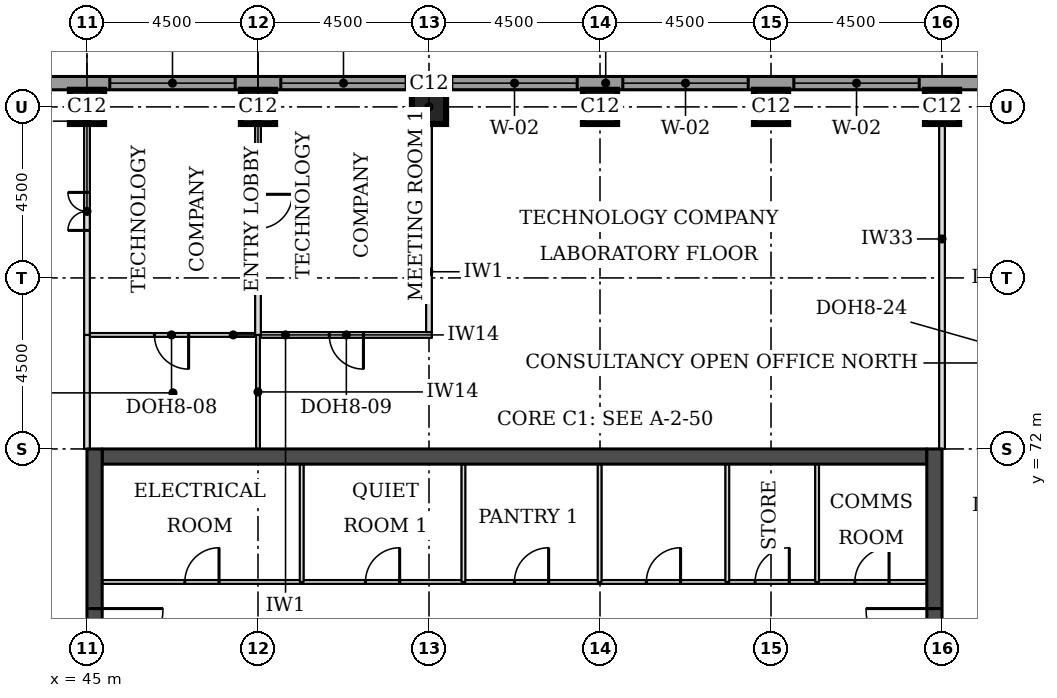
"""IFC4 building model, lengths in metres.
Left out: names, types, materials, properties, quantities, classifications, styles, units other than length and angle.
Written with IfcOpenShell. Run it as: python <this file> out.ifc"""

import sys

from ifc_helpers import new_model, si_unit, direction, frame, frame_2d, origin, origin_2d, place, context, subcontext, project, spatial, rectangle, extrude, element, fill, save


model = new_model("IFC4")
c1 = context("Model", 3, precision=1e-05, world=origin(), true_north=direction((0.0, 1.0)))
c2 = subcontext(c1, "Body", "Model", "MODEL_VIEW")
j1 = project(units=[si_unit("LENGTHUNIT", "METRE"), si_unit("PLANEANGLEUNIT", "RADIAN")], contexts=[c1])
p1 = place(None, origin())
s1 = spatial("IfcSite", under=j1, at=p1, CompositionType="ELEMENT")
p2 = place(p1, origin())
s2 = spatial("IfcBuilding", under=s1, at=p2, CompositionType="ELEMENT")
p3 = place(p2, frame((0.0, 0.0, 203.2)))
s3 = spatial("IfcBuildingStorey", under=s2, at=p3, CompositionType="ELEMENT", Elevation=203.2)
for number, where, z_axis, x_axis in (
    (1, (45.0, 81.0, 0.0), (0.0, 0.0, 1.0), (1.0, 0.0, 0.0)),
    (2, (49.5, 81.0, 0.0), (0.0, 0.0, 1.0), (1.0, 0.0, 0.0)),
    (3, (54.0, 81.0, 0.0), (0.0, 0.0, 1.0), (1.0, 0.0, 0.0)),
    (4, (58.5, 81.0, 0.0), (0.0, 0.0, 1.0), (1.0, 0.0, 0.0)),
    (5, (63.0, 81.0, 0.0), (0.0, 0.0, 1.0), (1.0, 0.0, 0.0)),
    (6, (67.5, 81.0, 0.0), (0.0, 0.0, 1.0), (1.0, 0.0, 0.0)),
):
    element("IfcColumn", number, at=place(p3, frame(where, z_axis=z_axis, x_axis=x_axis)), inside=s3, PredefinedType="COLUMN", context=c2, shape_type="SweptSolid", body=[
        extrude(rectangle(XDim=0.9, YDim=0.9, at=origin_2d()), origin(), (0.0, 0.0, 1.0), 3.7),
    ])
p4 = place(p3, frame((45.4, 71.8, 0.0), z_axis=(0.0, 0.0, 1.0), x_axis=(1.0, 0.0, 0.0)))
e7 = element("IfcWall", 7, at=p4, inside=s3, PredefinedType="SHEAR", context=c2, shape_type="SweptSolid", body=[
    extrude(rectangle(XDim=21.7, YDim=0.4, at=frame_2d((10.85, 0.0))), origin(), (0.0, 0.0, 1.0), 3.7),
])
p5 = place(p3, frame((45.2, 49.5, 0.0), z_axis=(0.0, 0.0, 1.0), x_axis=(0.0, 1.0, 0.0)))
e8 = element("IfcWall", 8, at=p5, inside=s3, PredefinedType="SHEAR", context=c2, shape_type="SweptSolid", body=[
    extrude(rectangle(XDim=22.5, YDim=0.4, at=frame_2d((11.25, 0.0))), origin(), (0.0, 0.0, 1.0), 3.7),
])
p6 = place(p5, frame((4.2, 0.0, 0.0)))
e9 = element("IfcOpeningElement", 9, at=p6, cuts=e8, PredefinedType="OPENING", context=c2, shape_type="SweptSolid", body=[
    extrude(rectangle(XDim=1.8, YDim=2.1, at=frame_2d((0.9, 1.05))), frame((0.0, 0.21, 0.0), z_axis=(0.0, -1.0, 0.0), x_axis=(1.0, 0.0, 0.0)), (0.0, 0.0, 1.0), 0.42),
])
p7 = place(p5, frame((6.9, 0.0, 0.0)))
e10 = element("IfcOpeningElement", 10, at=p7, cuts=e8, PredefinedType="OPENING", context=c2, shape_type="SweptSolid", body=[
    extrude(rectangle(XDim=1.1, YDim=2.1, at=frame_2d((0.55, 1.05))), frame((0.0, 0.21, 0.0), z_axis=(0.0, -1.0, 0.0), x_axis=(1.0, 0.0, 0.0)), (0.0, 0.0, 1.0), 0.42),
])
p8 = place(p5, frame((13.6, 0.0, 0.0)))
e11 = element("IfcOpeningElement", 11, at=p8, cuts=e8, PredefinedType="OPENING", context=c2, shape_type="SweptSolid", body=[
    extrude(rectangle(XDim=1.1, YDim=2.1, at=frame_2d((0.55, 1.05))), frame((0.0, 0.21, 0.0), z_axis=(0.0, -1.0, 0.0), x_axis=(1.0, 0.0, 0.0)), (0.0, 0.0, 1.0), 0.42),
])
p9 = place(p5, frame((16.5, 0.0, 0.0)))
e12 = element("IfcOpeningElement", 12, at=p9, cuts=e8, PredefinedType="OPENING", context=c2, shape_type="SweptSolid", body=[
    extrude(rectangle(XDim=1.8, YDim=2.1, at=frame_2d((0.9, 1.05))), frame((0.0, 0.21, 0.0), z_axis=(0.0, -1.0, 0.0), x_axis=(1.0, 0.0, 0.0)), (0.0, 0.0, 1.0), 0.42),
])
p10 = place(p3, frame((67.3, 49.5, 0.0), z_axis=(0.0, 0.0, 1.0), x_axis=(0.0, 1.0, 0.0)))
e13 = element("IfcWall", 13, at=p10, inside=s3, PredefinedType="SHEAR", context=c2, shape_type="SweptSolid", body=[
    extrude(rectangle(XDim=22.5, YDim=0.4, at=frame_2d((11.25, 0.0))), origin(), (0.0, 0.0, 1.0), 3.7),
])
p11 = place(p10, frame((4.2, 0.0, 0.0)))
e14 = element("IfcOpeningElement", 14, at=p11, cuts=e13, PredefinedType="OPENING", context=c2, shape_type="SweptSolid", body=[
    extrude(rectangle(XDim=1.8, YDim=2.1, at=frame_2d((0.9, 1.05))), frame((0.0, 0.21, 0.0), z_axis=(0.0, -1.0, 0.0), x_axis=(1.0, 0.0, 0.0)), (0.0, 0.0, 1.0), 0.42),
])
p12 = place(p10, frame((6.9, 0.0, 0.0)))
e15 = element("IfcOpeningElement", 15, at=p12, cuts=e13, PredefinedType="OPENING", context=c2, shape_type="SweptSolid", body=[
    extrude(rectangle(XDim=1.1, YDim=2.1, at=frame_2d((0.55, 1.05))), frame((0.0, 0.21, 0.0), z_axis=(0.0, -1.0, 0.0), x_axis=(1.0, 0.0, 0.0)), (0.0, 0.0, 1.0), 0.42),
])
p13 = place(p10, frame((13.6, 0.0, 0.0)))
e16 = element("IfcOpeningElement", 16, at=p13, cuts=e13, PredefinedType="OPENING", context=c2, shape_type="SweptSolid", body=[
    extrude(rectangle(XDim=1.1, YDim=2.1, at=frame_2d((0.55, 1.05))), frame((0.0, 0.21, 0.0), z_axis=(0.0, -1.0, 0.0), x_axis=(1.0, 0.0, 0.0)), (0.0, 0.0, 1.0), 0.42),
])
p14 = place(p10, frame((16.5, 0.0, 0.0)))
e17 = element("IfcOpeningElement", 17, at=p14, cuts=e13, PredefinedType="OPENING", context=c2, shape_type="SweptSolid", body=[
    extrude(rectangle(XDim=1.8, YDim=2.1, at=frame_2d((0.9, 1.05))), frame((0.0, 0.21, 0.0), z_axis=(0.0, -1.0, 0.0), x_axis=(1.0, 0.0, 0.0)), (0.0, 0.0, 1.0), 0.42),
])
p15 = place(p3, frame((72.331, 81.625, 0.0), z_axis=(0.0, 0.0, 1.0), x_axis=(-1.0, 0.0, 0.0)))
e18 = element("IfcWall", 18, at=p15, inside=s3, PredefinedType="STANDARD", context=c2, shape_type="SweptSolid", body=[
    extrude(rectangle(XDim=32.163, YDim=0.35, at=frame_2d((16.081, 0.0))), origin(), (0.0, 0.0, 1.0), 3.525),
])
p16 = place(p15, frame((5.431, 0.0, 0.9)))
e19 = element("IfcOpeningElement", 19, at=p16, cuts=e18, PredefinedType="OPENING", context=c2, shape_type="SweptSolid", body=[
    extrude(rectangle(XDim=3.3, YDim=1.9, at=frame_2d((1.65, 0.95))), frame((0.0, 0.185, 0.0), z_axis=(0.0, -1.0, 0.0), x_axis=(1.0, 0.0, 0.0)), (0.0, 0.0, 1.0), 0.37),
])
p17 = place(p15, frame((9.931, 0.0, 0.9)))
e20 = element("IfcOpeningElement", 20, at=p17, cuts=e18, PredefinedType="OPENING", context=c2, shape_type="SweptSolid", body=[
    extrude(rectangle(XDim=3.3, YDim=1.9, at=frame_2d((1.65, 0.95))), frame((0.0, 0.185, 0.0), z_axis=(0.0, -1.0, 0.0), x_axis=(1.0, 0.0, 0.0)), (0.0, 0.0, 1.0), 0.37),
])
p18 = place(p15, frame((14.431, 0.0, 0.9)))
e21 = element("IfcOpeningElement", 21, at=p18, cuts=e18, PredefinedType="OPENING", context=c2, shape_type="SweptSolid", body=[
    extrude(rectangle(XDim=3.3, YDim=1.9, at=frame_2d((1.65, 0.95))), frame((0.0, 0.185, 0.0), z_axis=(0.0, -1.0, 0.0), x_axis=(1.0, 0.0, 0.0)), (0.0, 0.0, 1.0), 0.37),
])
p19 = place(p15, frame((18.931, 0.0, 0.9)))
e22 = element("IfcOpeningElement", 22, at=p19, cuts=e18, PredefinedType="OPENING", context=c2, shape_type="SweptSolid", body=[
    extrude(rectangle(XDim=3.3, YDim=1.9, at=frame_2d((1.65, 0.95))), frame((0.0, 0.185, 0.0), z_axis=(0.0, -1.0, 0.0), x_axis=(1.0, 0.0, 0.0)), (0.0, 0.0, 1.0), 0.37),
])
p20 = place(p15, frame((23.431, 0.0, 0.9)))
e23 = element("IfcOpeningElement", 23, at=p20, cuts=e18, PredefinedType="OPENING", context=c2, shape_type="SweptSolid", body=[
    extrude(rectangle(XDim=3.3, YDim=1.9, at=frame_2d((1.65, 0.95))), frame((0.0, 0.185, 0.0), z_axis=(0.0, -1.0, 0.0), x_axis=(1.0, 0.0, 0.0)), (0.0, 0.0, 1.0), 0.37),
])
p21 = place(p3, frame((45.075, 75.0, 0.0), z_axis=(0.0, 0.0, 1.0), x_axis=(1.0, 0.0, 0.0)))
e24 = element("IfcWall", 24, at=p21, inside=s3, PredefinedType="PARTITIONING", context=c2, shape_type="SweptSolid", body=[
    extrude(rectangle(XDim=4.35, YDim=0.1, at=frame_2d((2.175, 0.0))), origin(), (0.0, 0.0, 1.0), 3.55),
])
p22 = place(p21, frame((1.7, 0.0, 0.0)))
e25 = element("IfcOpeningElement", 25, at=p22, cuts=e24, PredefinedType="OPENING", context=c2, shape_type="SweptSolid", body=[
    extrude(rectangle(XDim=0.9, YDim=2.1, at=frame_2d((0.45, 1.05))), frame((0.0, 0.06, 0.0), z_axis=(0.0, -1.0, 0.0), x_axis=(1.0, 0.0, 0.0)), (0.0, 0.0, 1.0), 0.12),
])
p23 = place(p3, frame((49.575, 75.0, 0.0), z_axis=(0.0, 0.0, 1.0), x_axis=(1.0, 0.0, 0.0)))
e26 = element("IfcWall", 26, at=p23, inside=s3, PredefinedType="PARTITIONING", context=c2, shape_type="SweptSolid", body=[
    extrude(rectangle(XDim=4.5, YDim=0.15, at=frame_2d((2.25, 0.0))), origin(), (0.0, 0.0, 1.0), 3.55),
])
p24 = place(p23, frame((1.8, 0.0, 0.0)))
e27 = element("IfcOpeningElement", 27, at=p24, cuts=e26, PredefinedType="OPENING", context=c2, shape_type="SweptSolid", body=[
    extrude(rectangle(XDim=0.9, YDim=2.1, at=frame_2d((0.45, 1.05))), frame((0.0, 0.085, 0.0), z_axis=(0.0, -1.0, 0.0), x_axis=(1.0, 0.0, 0.0)), (0.0, 0.0, 1.0), 0.17),
])
p25 = place(p3, frame((45.0, 72.0, 0.0), z_axis=(0.0, 0.0, 1.0), x_axis=(0.0, 1.0, 0.0)))
e28 = element("IfcWall", 28, at=p25, inside=s3, PredefinedType="PARTITIONING", context=c2, shape_type="SweptSolid", body=[
    extrude(rectangle(XDim=3.0, YDim=0.15, at=frame_2d((1.5, 0.0))), origin(), (0.0, 0.0, 1.0), 2.938),
])
p26 = place(p3, frame((49.5, 72.0, 0.0), z_axis=(0.0, 0.0, 1.0), x_axis=(0.0, 1.0, 0.0)))
e29 = element("IfcWall", 29, at=p26, inside=s3, PredefinedType="PARTITIONING", context=c2, shape_type="SweptSolid", body=[
    extrude(rectangle(XDim=3.0, YDim=0.1, at=frame_2d((1.5, 0.0))), origin(), (0.0, 0.0, 1.0), 3.55),
])
p27 = place(p3, frame((67.5, 72.0, 0.0), z_axis=(0.0, 0.0, 1.0), x_axis=(0.0, 1.0, 0.0)))
e30 = element("IfcWall", 30, at=p27, inside=s3, PredefinedType="PARTITIONING", context=c2, shape_type="SweptSolid", body=[
    extrude(rectangle(XDim=9.45, YDim=0.15, at=frame_2d((4.725, 0.0))), origin(), (0.0, 0.0, 1.0), 2.938),
])
p28 = place(p3, frame((45.0, 75.0, 0.0), z_axis=(0.0, 0.0, 1.0), x_axis=(0.0, 1.0, 0.0)))
e31 = element("IfcWall", 31, at=p28, inside=s3, PredefinedType="PARTITIONING", context=c2, shape_type="SweptSolid", body=[
    extrude(rectangle(XDim=6.45, YDim=0.15, at=frame_2d((3.225, 0.0))), origin(), (0.0, 0.0, 1.0), 2.938),
])
p29 = place(p28, frame((2.75, 0.0, 0.0)))
e32 = element("IfcOpeningElement", 32, at=p29, cuts=e31, PredefinedType="OPENING", context=c2, shape_type="SweptSolid", body=[
    extrude(rectangle(XDim=1.0, YDim=2.1, at=frame_2d((0.5, 1.05))), frame((0.0, 0.085, 0.0), z_axis=(0.0, -1.0, 0.0), x_axis=(1.0, 0.0, 0.0)), (0.0, 0.0, 1.0), 0.17),
])
p30 = place(p3, frame((49.5, 75.0, 0.0), z_axis=(0.0, 0.0, 1.0), x_axis=(0.0, 1.0, 0.0)))
e33 = element("IfcWall", 33, at=p30, inside=s3, PredefinedType="PARTITIONING", context=c2, shape_type="SweptSolid", body=[
    extrude(rectangle(XDim=6.45, YDim=0.15, at=frame_2d((3.225, 0.0))), origin(), (0.0, 0.0, 1.0), 3.55),
])
p31 = place(p30, frame((2.8, 0.0, 0.0)))
e34 = element("IfcOpeningElement", 34, at=p31, cuts=e33, PredefinedType="OPENING", context=c2, shape_type="SweptSolid", body=[
    extrude(rectangle(XDim=0.9, YDim=2.1, at=frame_2d((0.45, 1.05))), frame((0.0, 0.085, 0.0), z_axis=(0.0, -1.0, 0.0), x_axis=(1.0, 0.0, 0.0)), (0.0, 0.0, 1.0), 0.17),
])
p32 = place(p3, frame((54.0, 75.075, 0.0), z_axis=(0.0, 0.0, 1.0), x_axis=(0.0, 1.0, 0.0)))
e35 = element("IfcWall", 35, at=p32, inside=s3, PredefinedType="PARTITIONING", context=c2, shape_type="SweptSolid", body=[
    extrude(rectangle(XDim=6.375, YDim=0.15, at=frame_2d((3.188, 0.0))), origin(), (0.0, 0.0, 1.0), 3.55),
])
p33 = place(p3, frame((45.4, 68.5, 0.0), z_axis=(0.0, 0.0, 1.0), x_axis=(1.0, 0.0, 0.0)))
e36 = element("IfcWall", 36, at=p33, inside=s3, PredefinedType="PARTITIONING", context=c2, shape_type="SweptSolid", body=[
    extrude(rectangle(XDim=21.7, YDim=0.1, at=frame_2d((10.85, 0.0))), origin(), (0.0, 0.0, 1.0), 3.55),
])
p34 = place(p33, frame((19.806, 0.0, 0.0)))
e37 = element("IfcOpeningElement", 37, at=p34, cuts=e36, PredefinedType="OPENING", context=c2, shape_type="SweptSolid", body=[
    extrude(rectangle(XDim=0.9, YDim=2.1, at=frame_2d((0.45, 1.05))), frame((0.0, 0.06, 0.0), z_axis=(0.0, -1.0, 0.0), x_axis=(1.0, 0.0, 0.0)), (0.0, 0.0, 1.0), 0.12),
])
p35 = place(p33, frame((17.181, 0.0, 0.0)))
e38 = element("IfcOpeningElement", 38, at=p35, cuts=e36, PredefinedType="OPENING", context=c2, shape_type="SweptSolid", body=[
    extrude(rectangle(XDim=0.9, YDim=2.1, at=frame_2d((0.45, 1.05))), frame((0.0, 0.06, 0.0), z_axis=(0.0, -1.0, 0.0), x_axis=(1.0, 0.0, 0.0)), (0.0, 0.0, 1.0), 0.12),
])
p36 = place(p33, frame((2.175, 0.0, 0.0)))
e39 = element("IfcOpeningElement", 39, at=p36, cuts=e36, PredefinedType="OPENING", context=c2, shape_type="SweptSolid", body=[
    extrude(rectangle(XDim=0.9, YDim=2.1, at=frame_2d((0.45, 1.05))), frame((0.0, 0.06, 0.0), z_axis=(0.0, -1.0, 0.0), x_axis=(1.0, 0.0, 0.0)), (0.0, 0.0, 1.0), 0.12),
])
p37 = place(p33, frame((14.32, 0.0, 0.0)))
e40 = element("IfcOpeningElement", 40, at=p37, cuts=e36, PredefinedType="OPENING", context=c2, shape_type="SweptSolid", body=[
    extrude(rectangle(XDim=0.9, YDim=2.1, at=frame_2d((0.45, 1.05))), frame((0.0, 0.06, 0.0), z_axis=(0.0, -1.0, 0.0), x_axis=(1.0, 0.0, 0.0)), (0.0, 0.0, 1.0), 0.12),
])
p38 = place(p33, frame((10.848, 0.0, 0.0)))
e41 = element("IfcOpeningElement", 41, at=p38, cuts=e36, PredefinedType="OPENING", context=c2, shape_type="SweptSolid", body=[
    extrude(rectangle(XDim=0.9, YDim=2.1, at=frame_2d((0.45, 1.05))), frame((0.0, 0.06, 0.0), z_axis=(0.0, -1.0, 0.0), x_axis=(1.0, 0.0, 0.0)), (0.0, 0.0, 1.0), 0.12),
])
p39 = place(p33, frame((6.928, 0.0, 0.0)))
e42 = element("IfcOpeningElement", 42, at=p39, cuts=e36, PredefinedType="OPENING", context=c2, shape_type="SweptSolid", body=[
    extrude(rectangle(XDim=0.9, YDim=2.1, at=frame_2d((0.45, 1.05))), frame((0.0, 0.06, 0.0), z_axis=(0.0, -1.0, 0.0), x_axis=(1.0, 0.0, 0.0)), (0.0, 0.0, 1.0), 0.12),
])
for number, where, z_axis, x_axis in (
    (43, (50.65, 68.5, 0.0), (0.0, 0.0, 1.0), (0.0, 1.0, 0.0)),
    (44, (54.906, 68.5, 0.0), (0.0, 0.0, 1.0), (0.0, 1.0, 0.0)),
    (45, (58.49, 68.5, 0.0), (0.0, 0.0, 1.0), (0.0, 1.0, 0.0)),
    (46, (61.85, 68.5, 0.0), (0.0, 0.0, 1.0), (0.0, 1.0, 0.0)),
    (47, (64.212, 68.5, 0.0), (0.0, 0.0, 1.0), (0.0, 1.0, 0.0)),
):
    element("IfcWall", number, at=place(p3, frame(where, z_axis=z_axis, x_axis=x_axis)), inside=s3, PredefinedType="PARTITIONING", context=c2, shape_type="SweptSolid", body=[
        extrude(rectangle(XDim=3.1, YDim=0.1, at=frame_2d((1.55, 0.0))), origin(), (0.0, 0.0, 1.0), 3.55),
    ])
p40 = place(p16, origin())
e48 = element("IfcWindow", 48, at=p40, inside=s3, PartitioningType="SINGLE_PANEL", PredefinedType="WINDOW", context=c2, shape_type="SweptSolid", body=[
    extrude(rectangle(XDim=3.3, YDim=1.9, at=frame_2d((1.65, 0.95))), frame((0.0, 0.085, 0.0), z_axis=(0.0, -1.0, 0.0), x_axis=(1.0, 0.0, 0.0)), (0.0, 0.0, 1.0), 0.06),
])
fill(e19, e48)
p41 = place(p17, origin())
e49 = element("IfcWindow", 49, at=p41, inside=s3, PartitioningType="SINGLE_PANEL", PredefinedType="WINDOW", context=c2, shape_type="SweptSolid", body=[
    extrude(rectangle(XDim=3.3, YDim=1.9, at=frame_2d((1.65, 0.95))), frame((0.0, 0.085, 0.0), z_axis=(0.0, -1.0, 0.0), x_axis=(1.0, 0.0, 0.0)), (0.0, 0.0, 1.0), 0.06),
])
fill(e20, e49)
p42 = place(p18, origin())
e50 = element("IfcWindow", 50, at=p42, inside=s3, PartitioningType="SINGLE_PANEL", PredefinedType="WINDOW", context=c2, shape_type="SweptSolid", body=[
    extrude(rectangle(XDim=3.3, YDim=1.9, at=frame_2d((1.65, 0.95))), frame((0.0, 0.085, 0.0), z_axis=(0.0, -1.0, 0.0), x_axis=(1.0, 0.0, 0.0)), (0.0, 0.0, 1.0), 0.06),
])
fill(e21, e50)
p43 = place(p19, origin())
e51 = element("IfcWindow", 51, at=p43, inside=s3, PartitioningType="SINGLE_PANEL", PredefinedType="WINDOW", context=c2, shape_type="SweptSolid", body=[
    extrude(rectangle(XDim=3.3, YDim=1.9, at=frame_2d((1.65, 0.95))), frame((0.0, 0.085, 0.0), z_axis=(0.0, -1.0, 0.0), x_axis=(1.0, 0.0, 0.0)), (0.0, 0.0, 1.0), 0.06),
])
fill(e22, e51)
p44 = place(p20, origin())
e52 = element("IfcWindow", 52, at=p44, inside=s3, PartitioningType="SINGLE_PANEL", PredefinedType="WINDOW", context=c2, shape_type="SweptSolid", body=[
    extrude(rectangle(XDim=3.3, YDim=1.9, at=frame_2d((1.65, 0.95))), frame((0.0, 0.085, 0.0), z_axis=(0.0, -1.0, 0.0), x_axis=(1.0, 0.0, 0.0)), (0.0, 0.0, 1.0), 0.06),
])
fill(e23, e52)
p45 = place(p29, origin())
e53 = element("IfcDoor", 53, at=p45, inside=s3, OperationType="DOUBLE_DOOR_SINGLE_SWING", PredefinedType="DOOR", context=c2, shape_type="SweptSolid", body=[
    extrude(rectangle(XDim=1.0, YDim=2.1, at=frame_2d((0.5, 1.05))), frame((0.0, 0.025, 0.0), z_axis=(0.0, -1.0, 0.0), x_axis=(1.0, 0.0, 0.0)), (0.0, 0.0, 1.0), 0.05),
])
fill(e32, e53)
p46 = place(p31, frame((0.9, 0.0, 0.0), z_axis=(0.0, 0.0, 1.0), x_axis=(-1.0, 0.0, 0.0)))
e54 = element("IfcDoor", 54, at=p46, inside=s3, OperationType="SINGLE_SWING_LEFT", PredefinedType="DOOR", context=c2, shape_type="SweptSolid", body=[
    extrude(rectangle(XDim=0.9, YDim=2.1, at=frame_2d((0.45, 1.05))), frame((0.0, 0.025, 0.0), z_axis=(0.0, -1.0, 0.0), x_axis=(1.0, 0.0, 0.0)), (0.0, 0.0, 1.0), 0.05),
])
fill(e34, e54)
p47 = place(p22, frame((0.9, 0.0, 0.0), z_axis=(0.0, 0.0, 1.0), x_axis=(-1.0, 0.0, 0.0)))
e55 = element("IfcDoor", 55, at=p47, inside=s3, OperationType="SINGLE_SWING_LEFT", PredefinedType="DOOR", context=c2, shape_type="SweptSolid", body=[
    extrude(rectangle(XDim=0.9, YDim=2.1, at=frame_2d((0.45, 1.05))), frame((0.0, 0.025, 0.0), z_axis=(0.0, -1.0, 0.0), x_axis=(1.0, 0.0, 0.0)), (0.0, 0.0, 1.0), 0.05),
])
fill(e25, e55)
p48 = place(p24, frame((0.9, 0.0, 0.0), z_axis=(0.0, 0.0, 1.0), x_axis=(-1.0, 0.0, 0.0)))
e56 = element("IfcDoor", 56, at=p48, inside=s3, OperationType="SINGLE_SWING_LEFT", PredefinedType="DOOR", context=c2, shape_type="SweptSolid", body=[
    extrude(rectangle(XDim=0.9, YDim=2.1, at=frame_2d((0.45, 1.05))), frame((0.0, 0.025, 0.0), z_axis=(0.0, -1.0, 0.0), x_axis=(1.0, 0.0, 0.0)), (0.0, 0.0, 1.0), 0.05),
])
fill(e27, e56)
p49 = place(p9, frame((1.8, 0.0, 0.0), z_axis=(0.0, 0.0, 1.0), x_axis=(-1.0, 0.0, 0.0)))
e57 = element("IfcDoor", 57, at=p49, inside=s3, OperationType="SINGLE_SWING_LEFT", PredefinedType="DOOR", context=c2, shape_type="SweptSolid", body=[
    extrude(rectangle(XDim=1.8, YDim=2.1, at=frame_2d((0.9, 1.05))), frame((0.0, 0.025, 0.0), z_axis=(0.0, -1.0, 0.0), x_axis=(1.0, 0.0, 0.0)), (0.0, 0.0, 1.0), 0.05),
])
fill(e12, e57)
p50 = place(p14, origin())
e58 = element("IfcDoor", 58, at=p50, inside=s3, OperationType="SINGLE_SWING_RIGHT", PredefinedType="DOOR", context=c2, shape_type="SweptSolid", body=[
    extrude(rectangle(XDim=1.8, YDim=2.1, at=frame_2d((0.9, 1.05))), frame((0.0, 0.025, 0.0), z_axis=(0.0, -1.0, 0.0), x_axis=(1.0, 0.0, 0.0)), (0.0, 0.0, 1.0), 0.05),
])
fill(e17, e58)
p51 = place(p34, origin())
e59 = element("IfcDoor", 59, at=p51, inside=s3, OperationType="SINGLE_SWING_RIGHT", PredefinedType="DOOR", context=c2, shape_type="SweptSolid", body=[
    extrude(rectangle(XDim=0.9, YDim=2.1, at=frame_2d((0.45, 1.05))), frame((0.0, 0.025, 0.0), z_axis=(0.0, -1.0, 0.0), x_axis=(1.0, 0.0, 0.0)), (0.0, 0.0, 1.0), 0.05),
])
fill(e37, e59)
p52 = place(p35, origin())
e60 = element("IfcDoor", 60, at=p52, inside=s3, OperationType="SINGLE_SWING_RIGHT", PredefinedType="DOOR", context=c2, shape_type="SweptSolid", body=[
    extrude(rectangle(XDim=0.9, YDim=2.1, at=frame_2d((0.45, 1.05))), frame((0.0, 0.025, 0.0), z_axis=(0.0, -1.0, 0.0), x_axis=(1.0, 0.0, 0.0)), (0.0, 0.0, 1.0), 0.05),
])
fill(e38, e60)
p53 = place(p36, origin())
e61 = element("IfcDoor", 61, at=p53, inside=s3, OperationType="SINGLE_SWING_RIGHT", PredefinedType="DOOR", context=c2, shape_type="SweptSolid", body=[
    extrude(rectangle(XDim=0.9, YDim=2.1, at=frame_2d((0.45, 1.05))), frame((0.0, 0.025, 0.0), z_axis=(0.0, -1.0, 0.0), x_axis=(1.0, 0.0, 0.0)), (0.0, 0.0, 1.0), 0.05),
])
fill(e39, e61)
p54 = place(p37, origin())
e62 = element("IfcDoor", 62, at=p54, inside=s3, OperationType="SINGLE_SWING_RIGHT", PredefinedType="DOOR", context=c2, shape_type="SweptSolid", body=[
    extrude(rectangle(XDim=0.9, YDim=2.1, at=frame_2d((0.45, 1.05))), frame((0.0, 0.025, 0.0), z_axis=(0.0, -1.0, 0.0), x_axis=(1.0, 0.0, 0.0)), (0.0, 0.0, 1.0), 0.05),
])
fill(e40, e62)
p55 = place(p38, origin())
e63 = element("IfcDoor", 63, at=p55, inside=s3, OperationType="SINGLE_SWING_RIGHT", PredefinedType="DOOR", context=c2, shape_type="SweptSolid", body=[
    extrude(rectangle(XDim=0.9, YDim=2.1, at=frame_2d((0.45, 1.05))), frame((0.0, 0.025, 0.0), z_axis=(0.0, -1.0, 0.0), x_axis=(1.0, 0.0, 0.0)), (0.0, 0.0, 1.0), 0.05),
])
fill(e41, e63)
p56 = place(p39, origin())
e64 = element("IfcDoor", 64, at=p56, inside=s3, OperationType="SINGLE_SWING_RIGHT", PredefinedType="DOOR", context=c2, shape_type="SweptSolid", body=[
    extrude(rectangle(XDim=0.9, YDim=2.1, at=frame_2d((0.45, 1.05))), frame((0.0, 0.025, 0.0), z_axis=(0.0, -1.0, 0.0), x_axis=(1.0, 0.0, 0.0)), (0.0, 0.0, 1.0), 0.05),
])
fill(e42, e64)
save(model, sys.argv[1])
